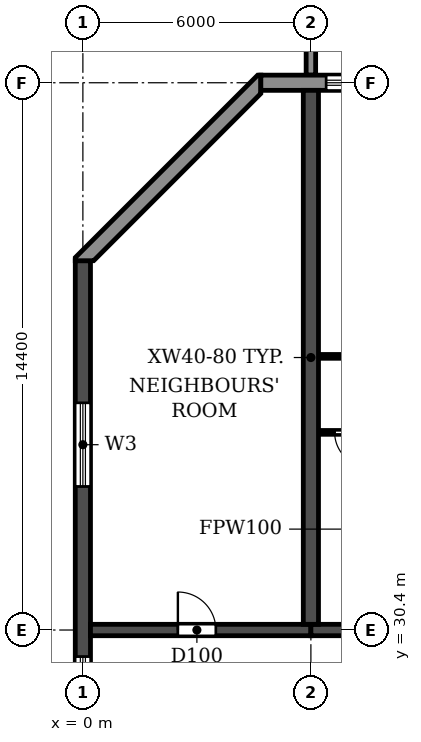
"""IFC4 building model, lengths in metres.
Left out: names, types, materials, properties, quantities, classifications, styles, units other than length and angle.
Written with IfcOpenShell. Run it as: python <this file> out.ifc"""

import sys

from ifc_helpers import new_model, si_unit, direction, frame, frame_2d, origin, place, context, subcontext, project, spatial, polyline, rectangle, outline, extrude, source, transform, mapped, element, fill, save


model = new_model("IFC4")
c1 = context("Model", 3, precision=1e-05, world=origin(), true_north=direction((0.0, 1.0)))
c2 = subcontext(c1, "Body", "Model", "MODEL_VIEW")
j1 = project(units=[si_unit("LENGTHUNIT", "METRE"), si_unit("PLANEANGLEUNIT", "RADIAN")], contexts=[c1])
p1 = place(None, origin())
s1 = spatial("IfcSite", under=j1, at=p1, CompositionType="ELEMENT")
p2 = place(p1, origin())
s2 = spatial("IfcBuilding", under=s1, at=p2, CompositionType="ELEMENT")
p3 = place(p2, frame((0.0, 0.0, 33.3)))
s3 = spatial("IfcBuildingStorey", under=s2, at=p3, CompositionType="ELEMENT", Elevation=33.3)
p4 = place(p3, frame((6.0, 30.55, 0.0), z_axis=(0.0, 0.0, 1.0), x_axis=(0.0, 1.0, 0.0)))
e1 = element("IfcWall", 1, at=p4, inside=s3, PredefinedType="SHEAR", context=c2, shape_type="SweptSolid", body=[
    extrude(rectangle(XDim=14.05, YDim=0.4, at=frame_2d((7.025, 0.0))), origin(), (0.0, 0.0, 1.0), 3.05),
])
p5 = place(p3, frame((0.0, 4.683, 0.0), z_axis=(0.0, 0.0, 1.0), x_axis=(0.0, 1.0, 0.0)))
e2 = element("IfcWall", 2, at=p5, inside=s3, PredefinedType="SHEAR", context=c2, shape_type="SweptSolid", body=[
    extrude(rectangle(XDim=35.434, YDim=0.4, at=frame_2d((17.717, 0.0))), origin(), (0.0, 0.0, 1.0), 3.05),
])
p6 = place(p5, frame((23.817, 0.0, 0.9)))
e3 = element("IfcOpeningElement", 3, at=p6, cuts=e2, PredefinedType="OPENING", context=c2, shape_type="SweptSolid", body=[
    extrude(rectangle(XDim=1.2, YDim=1.5, at=frame_2d((0.6, 0.75))), frame((0.0, 0.21, 0.0), z_axis=(0.0, -1.0, 0.0), x_axis=(1.0, 0.0, 0.0)), (0.0, 0.0, 1.0), 0.42),
])
p7 = place(p5, frame((8.017, 0.0, 0.9)))
e4 = element("IfcOpeningElement", 4, at=p7, cuts=e2, PredefinedType="OPENING", context=c2, shape_type="SweptSolid", body=[
    extrude(rectangle(XDim=1.2, YDim=1.5, at=frame_2d((0.6, 0.75))), frame((0.0, 0.21, 0.0), z_axis=(0.0, -1.0, 0.0), x_axis=(1.0, 0.0, 0.0)), (0.0, 0.0, 1.0), 0.42),
])
p8 = place(p5, frame((15.917, 0.0, 0.9)))
e5 = element("IfcOpeningElement", 5, at=p8, cuts=e2, PredefinedType="OPENING", context=c2, shape_type="SweptSolid", body=[
    extrude(rectangle(XDim=1.2, YDim=1.5, at=frame_2d((0.6, 0.75))), frame((0.0, 0.21, 0.0), z_axis=(0.0, -1.0, 0.0), x_axis=(1.0, 0.0, 0.0)), (0.0, 0.0, 1.0), 0.42),
])
p9 = place(p5, frame((29.493, 0.0, 0.6)))
e6 = element("IfcOpeningElement", 6, at=p9, cuts=e2, PredefinedType="OPENING", context=c2, shape_type="SweptSolid", body=[
    extrude(rectangle(XDim=2.2, YDim=1.8, at=frame_2d((1.1, 0.9))), frame((0.0, 0.21, 0.0), z_axis=(0.0, -1.0, 0.0), x_axis=(1.0, 0.0, 0.0)), (0.0, 0.0, 1.0), 0.42),
])
p10 = place(p5, frame((2.541, 0.0, 0.6)))
e7 = element("IfcOpeningElement", 7, at=p10, cuts=e2, PredefinedType="OPENING", context=c2, shape_type="SweptSolid", body=[
    extrude(rectangle(XDim=2.2, YDim=1.8, at=frame_2d((1.1, 0.9))), frame((0.0, 0.21, 0.0), z_axis=(0.0, -1.0, 0.0), x_axis=(1.0, 0.0, 0.0)), (0.0, 0.0, 1.0), 0.42),
])
p11 = place(p3, frame((0.2, 30.4, 0.0), z_axis=(0.0, 0.0, 1.0), x_axis=(1.0, 0.0, 0.0)))
e8 = element("IfcWall", 8, at=p11, inside=s3, PredefinedType="SHEAR", context=c2, shape_type="SweptSolid", body=[
    extrude(rectangle(XDim=5.8, YDim=0.3, at=frame_2d((2.9, 0.0))), origin(), (0.0, 0.0, 1.0), 2.45),
])
p12 = place(p11, frame((2.3, 0.0, 0.0)))
e9 = element("IfcOpeningElement", 9, at=p12, cuts=e8, PredefinedType="OPENING", context=c2, shape_type="SweptSolid", body=[
    extrude(rectangle(XDim=1.0, YDim=2.1, at=frame_2d((0.5, 1.05))), frame((0.0, 0.16, 0.0), z_axis=(0.0, -1.0, 0.0), x_axis=(1.0, 0.0, 0.0)), (0.0, 0.0, 1.0), 0.32),
])
p13 = place(p3, frame((6.0, 30.4, 0.0), z_axis=(0.0, 0.0, 1.0), x_axis=(1.0, 0.0, 0.0)))
e10 = element("IfcWall", 10, at=p13, inside=s3, PredefinedType="SHEAR", context=c2, shape_type="SweptSolid", body=[
    extrude(rectangle(XDim=6.0, YDim=0.3, at=frame_2d((3.0, 0.0))), origin(), (0.0, 0.0, 1.0), 2.45),
])
p14 = place(p13, frame((2.55, 0.0, 0.0)))
e11 = element("IfcOpeningElement", 11, at=p14, cuts=e10, PredefinedType="OPENING", context=c2, shape_type="SweptSolid", body=[
    extrude(rectangle(XDim=1.0, YDim=2.1, at=frame_2d((0.5, 1.05))), frame((0.0, 0.16, 0.0), z_axis=(0.0, -1.0, 0.0), x_axis=(1.0, 0.0, 0.0)), (0.0, 0.0, 1.0), 0.32),
])
p15 = place(p3, frame((97.317, 44.8, 0.0), z_axis=(0.0, 0.0, 1.0), x_axis=(-1.0, 0.0, 0.0)))
e12 = element("IfcWall", 12, at=p15, inside=s3, PredefinedType="STANDARD", context=c2, shape_type="SweptSolid", body=[
    extrude(rectangle(XDim=92.634, YDim=0.4, at=frame_2d((46.317, 0.0))), origin(), (0.0, 0.0, 1.0), 3.05),
])
p16 = place(p15, frame((88.717, 0.0, 0.9)))
e13 = element("IfcOpeningElement", 13, at=p16, cuts=e12, PredefinedType="OPENING", context=c2, shape_type="SweptSolid", body=[
    extrude(rectangle(XDim=2.2, YDim=1.5, at=frame_2d((1.1, 0.75))), frame((0.0, 0.21, 0.0), z_axis=(0.0, -1.0, 0.0), x_axis=(1.0, 0.0, 0.0)), (0.0, 0.0, 1.0), 0.42),
])
p17 = place(p15, frame((85.917, 0.0, 0.0)))
e14 = element("IfcOpeningElement", 14, at=p17, cuts=e12, PredefinedType="OPENING", context=c2, shape_type="SweptSolid", body=[
    extrude(rectangle(XDim=1.8, YDim=2.4, at=frame_2d((0.9, 1.2))), frame((0.0, 0.21, 0.0), z_axis=(0.0, -1.0, 0.0), x_axis=(1.0, 0.0, 0.0)), (0.0, 0.0, 1.0), 0.42),
])
p18 = place(p15, frame((82.717, 0.0, 0.9)))
e15 = element("IfcOpeningElement", 15, at=p18, cuts=e12, PredefinedType="OPENING", context=c2, shape_type="SweptSolid", body=[
    extrude(rectangle(XDim=2.2, YDim=1.5, at=frame_2d((1.1, 0.75))), frame((0.0, 0.21, 0.0), z_axis=(0.0, -1.0, 0.0), x_axis=(1.0, 0.0, 0.0)), (0.0, 0.0, 1.0), 0.42),
])
p19 = place(p15, frame((79.917, 0.0, 0.0)))
e16 = element("IfcOpeningElement", 16, at=p19, cuts=e12, PredefinedType="OPENING", context=c2, shape_type="SweptSolid", body=[
    extrude(rectangle(XDim=1.8, YDim=2.4, at=frame_2d((0.9, 1.2))), frame((0.0, 0.21, 0.0), z_axis=(0.0, -1.0, 0.0), x_axis=(1.0, 0.0, 0.0)), (0.0, 0.0, 1.0), 0.42),
])
p20 = place(p15, frame((76.717, 0.0, 0.9)))
e17 = element("IfcOpeningElement", 17, at=p20, cuts=e12, PredefinedType="OPENING", context=c2, shape_type="SweptSolid", body=[
    extrude(rectangle(XDim=2.2, YDim=1.5, at=frame_2d((1.1, 0.75))), frame((0.0, 0.21, 0.0), z_axis=(0.0, -1.0, 0.0), x_axis=(1.0, 0.0, 0.0)), (0.0, 0.0, 1.0), 0.42),
])
p21 = place(p15, frame((73.717, 0.0, 0.9)))
e18 = element("IfcOpeningElement", 18, at=p21, cuts=e12, PredefinedType="OPENING", context=c2, shape_type="SweptSolid", body=[
    extrude(rectangle(XDim=2.2, YDim=1.5, at=frame_2d((1.1, 0.75))), frame((0.0, 0.21, 0.0), z_axis=(0.0, -1.0, 0.0), x_axis=(1.0, 0.0, 0.0)), (0.0, 0.0, 1.0), 0.42),
])
p22 = place(p15, frame((70.717, 0.0, 0.9)))
e19 = element("IfcOpeningElement", 19, at=p22, cuts=e12, PredefinedType="OPENING", context=c2, shape_type="SweptSolid", body=[
    extrude(rectangle(XDim=2.2, YDim=1.5, at=frame_2d((1.1, 0.75))), frame((0.0, 0.21, 0.0), z_axis=(0.0, -1.0, 0.0), x_axis=(1.0, 0.0, 0.0)), (0.0, 0.0, 1.0), 0.42),
])
p23 = place(p15, frame((67.917, 0.0, 0.0)))
e20 = element("IfcOpeningElement", 20, at=p23, cuts=e12, PredefinedType="OPENING", context=c2, shape_type="SweptSolid", body=[
    extrude(rectangle(XDim=1.8, YDim=2.4, at=frame_2d((0.9, 1.2))), frame((0.0, 0.21, 0.0), z_axis=(0.0, -1.0, 0.0), x_axis=(1.0, 0.0, 0.0)), (0.0, 0.0, 1.0), 0.42),
])
p24 = place(p15, frame((64.717, 0.0, 0.9)))
e21 = element("IfcOpeningElement", 21, at=p24, cuts=e12, PredefinedType="OPENING", context=c2, shape_type="SweptSolid", body=[
    extrude(rectangle(XDim=2.2, YDim=1.5, at=frame_2d((1.1, 0.75))), frame((0.0, 0.21, 0.0), z_axis=(0.0, -1.0, 0.0), x_axis=(1.0, 0.0, 0.0)), (0.0, 0.0, 1.0), 0.42),
])
p25 = place(p15, frame((61.717, 0.0, 0.9)))
e22 = element("IfcOpeningElement", 22, at=p25, cuts=e12, PredefinedType="OPENING", context=c2, shape_type="SweptSolid", body=[
    extrude(rectangle(XDim=2.2, YDim=1.5, at=frame_2d((1.1, 0.75))), frame((0.0, 0.21, 0.0), z_axis=(0.0, -1.0, 0.0), x_axis=(1.0, 0.0, 0.0)), (0.0, 0.0, 1.0), 0.42),
])
p26 = place(p15, frame((58.717, 0.0, 0.9)))
e23 = element("IfcOpeningElement", 23, at=p26, cuts=e12, PredefinedType="OPENING", context=c2, shape_type="SweptSolid", body=[
    extrude(rectangle(XDim=2.2, YDim=1.5, at=frame_2d((1.1, 0.75))), frame((0.0, 0.21, 0.0), z_axis=(0.0, -1.0, 0.0), x_axis=(1.0, 0.0, 0.0)), (0.0, 0.0, 1.0), 0.42),
])
p27 = place(p15, frame((55.917, 0.0, 0.0)))
e24 = element("IfcOpeningElement", 24, at=p27, cuts=e12, PredefinedType="OPENING", context=c2, shape_type="SweptSolid", body=[
    extrude(rectangle(XDim=1.8, YDim=2.4, at=frame_2d((0.9, 1.2))), frame((0.0, 0.21, 0.0), z_axis=(0.0, -1.0, 0.0), x_axis=(1.0, 0.0, 0.0)), (0.0, 0.0, 1.0), 0.42),
])
p28 = place(p15, frame((52.717, 0.0, 0.9)))
e25 = element("IfcOpeningElement", 25, at=p28, cuts=e12, PredefinedType="OPENING", context=c2, shape_type="SweptSolid", body=[
    extrude(rectangle(XDim=2.2, YDim=1.5, at=frame_2d((1.1, 0.75))), frame((0.0, 0.21, 0.0), z_axis=(0.0, -1.0, 0.0), x_axis=(1.0, 0.0, 0.0)), (0.0, 0.0, 1.0), 0.42),
])
p29 = place(p15, frame((49.717, 0.0, 0.9)))
e26 = element("IfcOpeningElement", 26, at=p29, cuts=e12, PredefinedType="OPENING", context=c2, shape_type="SweptSolid", body=[
    extrude(rectangle(XDim=2.2, YDim=1.5, at=frame_2d((1.1, 0.75))), frame((0.0, 0.21, 0.0), z_axis=(0.0, -1.0, 0.0), x_axis=(1.0, 0.0, 0.0)), (0.0, 0.0, 1.0), 0.42),
])
p30 = place(p15, frame((46.717, 0.0, 0.9)))
e27 = element("IfcOpeningElement", 27, at=p30, cuts=e12, PredefinedType="OPENING", context=c2, shape_type="SweptSolid", body=[
    extrude(rectangle(XDim=2.2, YDim=1.5, at=frame_2d((1.1, 0.75))), frame((0.0, 0.21, 0.0), z_axis=(0.0, -1.0, 0.0), x_axis=(1.0, 0.0, 0.0)), (0.0, 0.0, 1.0), 0.42),
])
p31 = place(p15, frame((43.917, 0.0, 0.0)))
e28 = element("IfcOpeningElement", 28, at=p31, cuts=e12, PredefinedType="OPENING", context=c2, shape_type="SweptSolid", body=[
    extrude(rectangle(XDim=1.8, YDim=2.4, at=frame_2d((0.9, 1.2))), frame((0.0, 0.21, 0.0), z_axis=(0.0, -1.0, 0.0), x_axis=(1.0, 0.0, 0.0)), (0.0, 0.0, 1.0), 0.42),
])
p32 = place(p15, frame((40.717, 0.0, 0.9)))
e29 = element("IfcOpeningElement", 29, at=p32, cuts=e12, PredefinedType="OPENING", context=c2, shape_type="SweptSolid", body=[
    extrude(rectangle(XDim=2.2, YDim=1.5, at=frame_2d((1.1, 0.75))), frame((0.0, 0.21, 0.0), z_axis=(0.0, -1.0, 0.0), x_axis=(1.0, 0.0, 0.0)), (0.0, 0.0, 1.0), 0.42),
])
p33 = place(p15, frame((37.717, 0.0, 0.9)))
e30 = element("IfcOpeningElement", 30, at=p33, cuts=e12, PredefinedType="OPENING", context=c2, shape_type="SweptSolid", body=[
    extrude(rectangle(XDim=2.2, YDim=1.5, at=frame_2d((1.1, 0.75))), frame((0.0, 0.21, 0.0), z_axis=(0.0, -1.0, 0.0), x_axis=(1.0, 0.0, 0.0)), (0.0, 0.0, 1.0), 0.42),
])
p34 = place(p15, frame((34.717, 0.0, 0.9)))
e31 = element("IfcOpeningElement", 31, at=p34, cuts=e12, PredefinedType="OPENING", context=c2, shape_type="SweptSolid", body=[
    extrude(rectangle(XDim=2.2, YDim=1.5, at=frame_2d((1.1, 0.75))), frame((0.0, 0.21, 0.0), z_axis=(0.0, -1.0, 0.0), x_axis=(1.0, 0.0, 0.0)), (0.0, 0.0, 1.0), 0.42),
])
p35 = place(p15, frame((31.917, 0.0, 0.0)))
e32 = element("IfcOpeningElement", 32, at=p35, cuts=e12, PredefinedType="OPENING", context=c2, shape_type="SweptSolid", body=[
    extrude(rectangle(XDim=1.8, YDim=2.4, at=frame_2d((0.9, 1.2))), frame((0.0, 0.21, 0.0), z_axis=(0.0, -1.0, 0.0), x_axis=(1.0, 0.0, 0.0)), (0.0, 0.0, 1.0), 0.42),
])
p36 = place(p15, frame((28.717, 0.0, 0.9)))
e33 = element("IfcOpeningElement", 33, at=p36, cuts=e12, PredefinedType="OPENING", context=c2, shape_type="SweptSolid", body=[
    extrude(rectangle(XDim=2.2, YDim=1.5, at=frame_2d((1.1, 0.75))), frame((0.0, 0.21, 0.0), z_axis=(0.0, -1.0, 0.0), x_axis=(1.0, 0.0, 0.0)), (0.0, 0.0, 1.0), 0.42),
])
p37 = place(p15, frame((25.717, 0.0, 0.9)))
e34 = element("IfcOpeningElement", 34, at=p37, cuts=e12, PredefinedType="OPENING", context=c2, shape_type="SweptSolid", body=[
    extrude(rectangle(XDim=2.2, YDim=1.5, at=frame_2d((1.1, 0.75))), frame((0.0, 0.21, 0.0), z_axis=(0.0, -1.0, 0.0), x_axis=(1.0, 0.0, 0.0)), (0.0, 0.0, 1.0), 0.42),
])
p38 = place(p15, frame((22.917, 0.0, 0.0)))
e35 = element("IfcOpeningElement", 35, at=p38, cuts=e12, PredefinedType="OPENING", context=c2, shape_type="SweptSolid", body=[
    extrude(rectangle(XDim=1.8, YDim=2.4, at=frame_2d((0.9, 1.2))), frame((0.0, 0.21, 0.0), z_axis=(0.0, -1.0, 0.0), x_axis=(1.0, 0.0, 0.0)), (0.0, 0.0, 1.0), 0.42),
])
p39 = place(p15, frame((19.717, 0.0, 0.9)))
e36 = element("IfcOpeningElement", 36, at=p39, cuts=e12, PredefinedType="OPENING", context=c2, shape_type="SweptSolid", body=[
    extrude(rectangle(XDim=2.2, YDim=1.5, at=frame_2d((1.1, 0.75))), frame((0.0, 0.21, 0.0), z_axis=(0.0, -1.0, 0.0), x_axis=(1.0, 0.0, 0.0)), (0.0, 0.0, 1.0), 0.42),
])
p40 = place(p15, frame((16.717, 0.0, 0.9)))
e37 = element("IfcOpeningElement", 37, at=p40, cuts=e12, PredefinedType="OPENING", context=c2, shape_type="SweptSolid", body=[
    extrude(rectangle(XDim=2.2, YDim=1.5, at=frame_2d((1.1, 0.75))), frame((0.0, 0.21, 0.0), z_axis=(0.0, -1.0, 0.0), x_axis=(1.0, 0.0, 0.0)), (0.0, 0.0, 1.0), 0.42),
])
p41 = place(p15, frame((13.917, 0.0, 0.0)))
e38 = element("IfcOpeningElement", 38, at=p41, cuts=e12, PredefinedType="OPENING", context=c2, shape_type="SweptSolid", body=[
    extrude(rectangle(XDim=1.8, YDim=2.4, at=frame_2d((0.9, 1.2))), frame((0.0, 0.21, 0.0), z_axis=(0.0, -1.0, 0.0), x_axis=(1.0, 0.0, 0.0)), (0.0, 0.0, 1.0), 0.42),
])
p42 = place(p15, frame((10.717, 0.0, 0.9)))
e39 = element("IfcOpeningElement", 39, at=p42, cuts=e12, PredefinedType="OPENING", context=c2, shape_type="SweptSolid", body=[
    extrude(rectangle(XDim=2.2, YDim=1.5, at=frame_2d((1.1, 0.75))), frame((0.0, 0.21, 0.0), z_axis=(0.0, -1.0, 0.0), x_axis=(1.0, 0.0, 0.0)), (0.0, 0.0, 1.0), 0.42),
])
p43 = place(p15, frame((7.917, 0.0, 0.0)))
e40 = element("IfcOpeningElement", 40, at=p43, cuts=e12, PredefinedType="OPENING", context=c2, shape_type="SweptSolid", body=[
    extrude(rectangle(XDim=1.8, YDim=2.4, at=frame_2d((0.9, 1.2))), frame((0.0, 0.21, 0.0), z_axis=(0.0, -1.0, 0.0), x_axis=(1.0, 0.0, 0.0)), (0.0, 0.0, 1.0), 0.42),
])
p44 = place(p15, frame((4.717, 0.0, 0.9)))
e41 = element("IfcOpeningElement", 41, at=p44, cuts=e12, PredefinedType="OPENING", context=c2, shape_type="SweptSolid", body=[
    extrude(rectangle(XDim=2.2, YDim=1.5, at=frame_2d((1.1, 0.75))), frame((0.0, 0.21, 0.0), z_axis=(0.0, -1.0, 0.0), x_axis=(1.0, 0.0, 0.0)), (0.0, 0.0, 1.0), 0.42),
])
p45 = place(p15, frame((1.917, 0.0, 0.0)))
e42 = element("IfcOpeningElement", 42, at=p45, cuts=e12, PredefinedType="OPENING", context=c2, shape_type="SweptSolid", body=[
    extrude(rectangle(XDim=1.8, YDim=2.4, at=frame_2d((0.9, 1.2))), frame((0.0, 0.21, 0.0), z_axis=(0.0, -1.0, 0.0), x_axis=(1.0, 0.0, 0.0)), (0.0, 0.0, 1.0), 0.42),
])
p46 = place(p3, origin())
e43 = element("IfcWall", 43, at=p46, inside=s3, PredefinedType="STANDARD", context=c2, shape_type="SweptSolid", body=[
    extrude(outline(polyline([(4.683, 45.0), (4.6, 45.0), (-0.2, 40.2), (-0.2, 40.117), (0.283, 40.117), (4.683, 44.517), (4.683, 45.0)])), origin(), (0.0, 0.0, 1.0), 3.05),
])
m1 = source(origin(), c2, "Body", "SweptSolid", [
    extrude(outline(polyline([(0.0, 0.0), (0.25, 0.0), (0.25, 3.1), (0.0, 3.1), (0.0, 0.0)])), origin(), (0.0, 0.0, 1.0), 3.1),
])
p47 = place(p3, frame((5.875, 45.0, 0.0)))
e44 = element("IfcWall", 44, at=p47, inside=s3, PredefinedType="STANDARD", context=c2, shape_type="MappedRepresentation", body=[
    mapped(m1, transform((0.0, 0.0, 0.0))),
])
p48 = place(p3, frame((6.21, 35.6, 0.0), z_axis=(0.0, 0.0, 1.0), x_axis=(1.0, 0.0, 0.0)))
e45 = element("IfcWall", 45, at=p48, inside=s3, PredefinedType="PARTITIONING", context=c2, shape_type="SweptSolid", body=[
    extrude(rectangle(XDim=1.99, YDim=0.1, at=frame_2d((0.995, 0.0))), origin(), (0.0, 0.0, 1.0), 3.05),
])
p49 = place(p48, frame((0.415, 0.0, 0.0)))
e46 = element("IfcOpeningElement", 46, at=p49, cuts=e45, PredefinedType="OPENING", context=c2, shape_type="SweptSolid", body=[
    extrude(rectangle(XDim=0.9, YDim=2.1, at=frame_2d((0.45, 1.05))), frame((0.0, 0.06, 0.0), z_axis=(0.0, -1.0, 0.0), x_axis=(1.0, 0.0, 0.0)), (0.0, 0.0, 1.0), 0.12),
])
p50 = place(p3, frame((6.21, 37.6, 0.0), z_axis=(0.0, 0.0, 1.0), x_axis=(1.0, 0.0, 0.0)))
e47 = element("IfcWall", 47, at=p50, inside=s3, PredefinedType="PARTITIONING", context=c2, shape_type="SweptSolid", body=[
    extrude(rectangle(XDim=2.84, YDim=0.1, at=frame_2d((1.42, 0.0))), origin(), (0.0, 0.0, 1.0), 3.05),
])
p51 = place(p50, frame((1.39, 0.0, 0.0)))
e48 = element("IfcOpeningElement", 48, at=p51, cuts=e47, PredefinedType="OPENING", context=c2, shape_type="SweptSolid", body=[
    extrude(rectangle(XDim=0.9, YDim=2.1, at=frame_2d((0.45, 1.05))), frame((0.0, 0.06, 0.0), z_axis=(0.0, -1.0, 0.0), x_axis=(1.0, 0.0, 0.0)), (0.0, 0.0, 1.0), 0.12),
])
p52 = place(p16, origin())
e49 = element("IfcWindow", 49, at=p52, inside=s3, PartitioningType="DOUBLE_PANEL_HORIZONTAL", PredefinedType="WINDOW", context=c2, shape_type="SweptSolid", body=[
    extrude(rectangle(XDim=2.2, YDim=1.5, at=frame_2d((1.1, 0.75))), frame((0.0, 0.03, 0.0), z_axis=(0.0, -1.0, 0.0), x_axis=(1.0, 0.0, 0.0)), (0.0, 0.0, 1.0), 0.06),
])
fill(e13, e49)
p53 = place(p6, origin())
e50 = element("IfcWindow", 50, at=p53, inside=s3, PartitioningType="SINGLE_PANEL", PredefinedType="WINDOW", context=c2, shape_type="SweptSolid", body=[
    extrude(rectangle(XDim=1.2, YDim=1.5, at=frame_2d((0.6, 0.75))), frame((0.0, 0.03, 0.0), z_axis=(0.0, -1.0, 0.0), x_axis=(1.0, 0.0, 0.0)), (0.0, 0.0, 1.0), 0.06),
])
fill(e3, e50)
p54 = place(p9, origin())
e51 = element("IfcWindow", 51, at=p54, inside=s3, PartitioningType="DOUBLE_PANEL_HORIZONTAL", PredefinedType="WINDOW", context=c2, shape_type="SweptSolid", body=[
    extrude(rectangle(XDim=2.2, YDim=1.8, at=frame_2d((1.1, 0.9))), frame((0.0, 0.03, 0.0), z_axis=(0.0, -1.0, 0.0), x_axis=(1.0, 0.0, 0.0)), (0.0, 0.0, 1.0), 0.06),
])
fill(e6, e51)
p55 = place(p12, origin())
e52 = element("IfcDoor", 52, at=p55, inside=s3, OperationType="SINGLE_SWING_LEFT", PredefinedType="DOOR", context=c2, shape_type="SweptSolid", body=[
    extrude(rectangle(XDim=1.0, YDim=2.1, at=frame_2d((0.5, 1.05))), frame((0.0, 0.025, 0.0), z_axis=(0.0, -1.0, 0.0), x_axis=(1.0, 0.0, 0.0)), (0.0, 0.0, 1.0), 0.05),
])
fill(e9, e52)
p56 = place(p49, frame((0.9, 0.0, 0.0), z_axis=(0.0, 0.0, 1.0), x_axis=(-1.0, 0.0, 0.0)))
e53 = element("IfcDoor", 53, at=p56, inside=s3, OperationType="SINGLE_SWING_LEFT", PredefinedType="DOOR", context=c2, shape_type="SweptSolid", body=[
    extrude(rectangle(XDim=0.9, YDim=2.1, at=frame_2d((0.45, 1.05))), frame((0.0, 0.025, 0.0), z_axis=(0.0, -1.0, 0.0), x_axis=(1.0, 0.0, 0.0)), (0.0, 0.0, 1.0), 0.05),
])
fill(e46, e53)
save(model, sys.argv[1])
